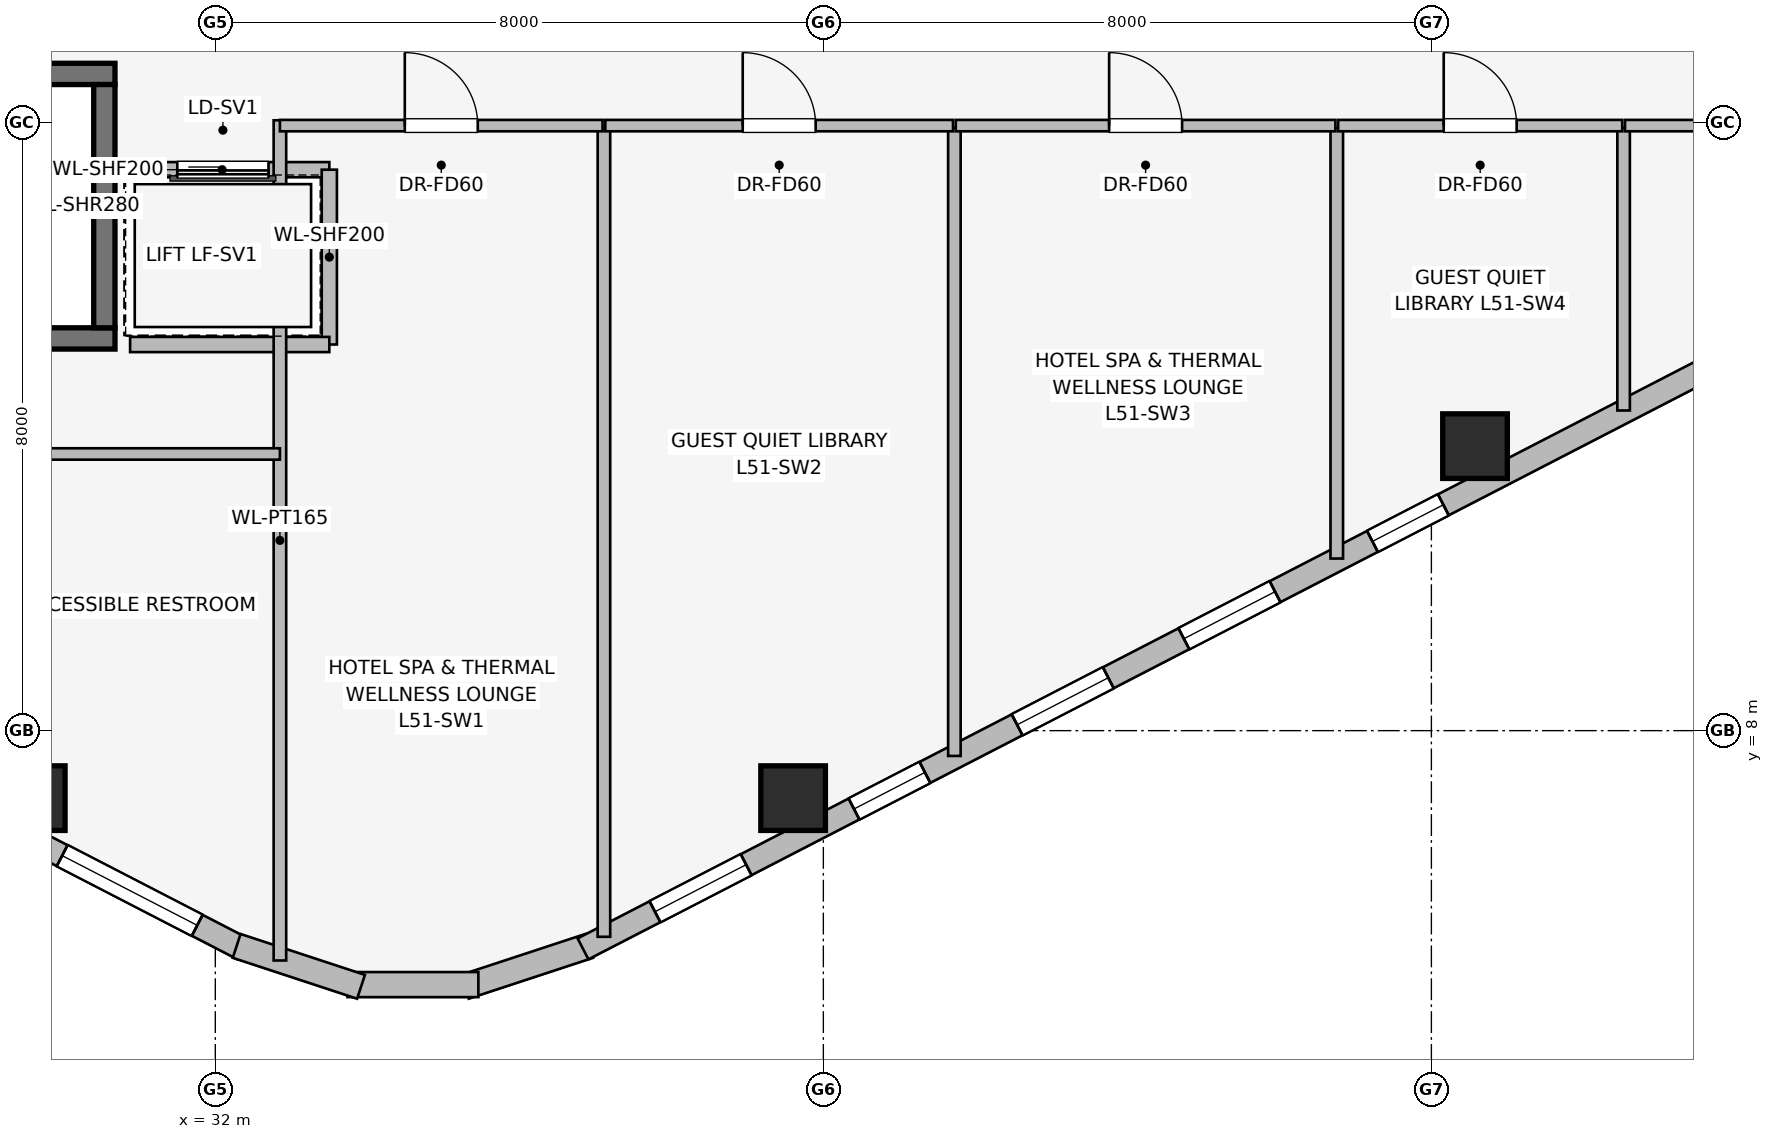
"""IFC4 building model, lengths in metres.
Left out: names, types, materials, properties, quantities, classifications, styles, units other than length and angle.
Written with IfcOpenShell. Run it as: python <this file> out.ifc"""

import sys

from ifc_helpers import new_model, si_unit, direction, frame, frame_2d, origin, origin_2d, place, context, subcontext, project, spatial, rectangle, extrude, element, fill, save


model = new_model("IFC4")
c1 = context("Model", 3, precision=1e-05, world=origin(), true_north=direction((0.0, 1.0)))
c2 = subcontext(c1, "Body", "Model", "MODEL_VIEW")
j1 = project(units=[si_unit("LENGTHUNIT", "METRE"), si_unit("PLANEANGLEUNIT", "RADIAN")], contexts=[c1])
p1 = place(None, origin())
s1 = spatial("IfcSite", under=j1, at=p1, CompositionType="ELEMENT")
p2 = place(p1, origin())
s2 = spatial("IfcBuilding", under=s1, at=p2, CompositionType="ELEMENT")
p3 = place(p2, frame((0.0, 0.0, 187.8)))
s3 = spatial("IfcBuildingStorey", under=s2, at=p3, CompositionType="ELEMENT", Elevation=187.8)
p4 = place(p3, frame((22.32, 13.16, 0.0), z_axis=(0.0, 0.0, 1.0), x_axis=(1.0, 0.0, 0.0)))
e1 = element("IfcWall", 1, at=p4, inside=s3, PredefinedType="SHEAR", context=c2, shape_type="SweptSolid", body=[
    extrude(rectangle(XDim=8.36, YDim=0.28, at=frame_2d((4.18, 0.0))), origin(), (0.0, 0.0, 1.0), 3.45),
])
p5 = place(p3, frame((30.68, 16.64, 0.0), z_axis=(0.0, 0.0, 1.0), x_axis=(-1.0, 0.0, 0.0)))
e2 = element("IfcWall", 2, at=p5, inside=s3, PredefinedType="SHEAR", context=c2, shape_type="SweptSolid", body=[
    extrude(rectangle(XDim=8.36, YDim=0.28, at=frame_2d((4.18, 0.0))), origin(), (0.0, 0.0, 1.0), 3.45),
])
p6 = place(p5, frame((6.08, 0.0, 0.0)))
e3 = element("IfcOpeningElement", 3, at=p6, cuts=e2, PredefinedType="OPENING", context=c2, shape_type="SweptSolid", body=[
    extrude(rectangle(XDim=1.05, YDim=2.0, at=frame_2d((0.525, 1.0))), frame((0.0, 0.15, 0.0), z_axis=(0.0, -1.0, 0.0), x_axis=(1.0, 0.0, 0.0)), (0.0, 0.0, 1.0), 0.3),
])
p7 = place(p3, frame((30.54, 13.3, 0.0), z_axis=(0.0, 0.0, 1.0), x_axis=(0.0, 1.0, 0.0)))
e4 = element("IfcWall", 4, at=p7, inside=s3, PredefinedType="SHEAR", context=c2, shape_type="SweptSolid", body=[
    extrude(rectangle(XDim=3.2, YDim=0.28, at=frame_2d((1.6, 0.0))), origin(), (0.0, 0.0, 1.0), 3.45),
])
for number, where, z_axis, x_axis in (
    (5, (29.598, 7.112, 0.0), (0.0, 0.0, 1.0), (1.0, 0.0, 0.0)),
    (6, (39.602, 7.112, 0.0), (0.0, 0.0, 1.0), (1.0, 0.0, 0.0)),
    (7, (48.574, 11.743, 0.0), (0.0, 0.0, 1.0), (1.0, 0.0, 0.0)),
):
    element("IfcColumn", number, at=place(p3, frame(where, z_axis=z_axis, x_axis=x_axis)), inside=s3, PredefinedType="COLUMN", context=c2, shape_type="SweptSolid", body=[
        extrude(rectangle(XDim=0.85, YDim=0.85, at=origin_2d()), origin(), (0.0, 0.0, 1.0), 3.45),
    ])
p8 = place(p3, frame((32.362, 5.129, 0.0), z_axis=(0.0, 0.0, 1.0), x_axis=(-0.888626188278, 0.458632202867, 0.0)))
e8 = element("IfcWall", 8, at=p8, inside=s3, PredefinedType="STANDARD", context=c2, shape_type="SweptSolid", body=[
    extrude(rectangle(XDim=16.828, YDim=0.31, at=frame_2d((8.414, 0.0))), origin(), (0.0, 0.0, 1.0), 3.14),
])
p9 = place(p8, frame((7.864, 0.0, 0.0)))
e9 = element("IfcOpeningElement", 9, at=p9, cuts=e8, PredefinedType="OPENING", context=c2, shape_type="SweptSolid", body=[
    extrude(rectangle(XDim=1.1, YDim=2.04, at=frame_2d((0.55, 1.02))), frame((0.0, 0.165, 0.0), z_axis=(0.0, -1.0, 0.0), x_axis=(1.0, 0.0, 0.0)), (0.0, 0.0, 1.0), 0.33),
])
p10 = place(p8, frame((0.675, 0.0, 0.75)))
e10 = element("IfcOpeningElement", 10, at=p10, cuts=e8, PredefinedType="OPENING", context=c2, shape_type="SweptSolid", body=[
    extrude(rectangle(XDim=2.0, YDim=1.5, at=frame_2d((1.0, 0.75))), frame((0.0, 0.165, 0.0), z_axis=(0.0, -1.0, 0.0), x_axis=(1.0, 0.0, 0.0)), (0.0, 0.0, 1.0), 0.33),
])
p11 = place(p8, frame((4.159, 0.0, 0.75)))
e11 = element("IfcOpeningElement", 11, at=p11, cuts=e8, PredefinedType="OPENING", context=c2, shape_type="SweptSolid", body=[
    extrude(rectangle(XDim=1.35, YDim=1.45, at=frame_2d((0.675, 0.725))), frame((0.0, 0.165, 0.0), z_axis=(0.0, -1.0, 0.0), x_axis=(1.0, 0.0, 0.0)), (0.0, 0.0, 1.0), 0.33),
])
p12 = place(p8, frame((5.966, 0.0, 0.75)))
e12 = element("IfcOpeningElement", 12, at=p12, cuts=e8, PredefinedType="OPENING", context=c2, shape_type="SweptSolid", body=[
    extrude(rectangle(XDim=1.35, YDim=1.45, at=frame_2d((0.675, 0.725))), frame((0.0, 0.165, 0.0), z_axis=(0.0, -1.0, 0.0), x_axis=(1.0, 0.0, 0.0)), (0.0, 0.0, 1.0), 0.33),
])
p13 = place(p8, frame((10.091, 0.0, 0.75)))
e13 = element("IfcOpeningElement", 13, at=p13, cuts=e8, PredefinedType="OPENING", context=c2, shape_type="SweptSolid", body=[
    extrude(rectangle(XDim=2.0, YDim=1.5, at=frame_2d((1.0, 0.75))), frame((0.0, 0.165, 0.0), z_axis=(0.0, -1.0, 0.0), x_axis=(1.0, 0.0, 0.0)), (0.0, 0.0, 1.0), 0.33),
])
p14 = place(p8, frame((14.735, 0.0, 0.75)))
e14 = element("IfcOpeningElement", 14, at=p14, cuts=e8, PredefinedType="OPENING", context=c2, shape_type="SweptSolid", body=[
    extrude(rectangle(XDim=1.35, YDim=1.45, at=frame_2d((0.675, 0.725))), frame((0.0, 0.165, 0.0), z_axis=(0.0, -1.0, 0.0), x_axis=(1.0, 0.0, 0.0)), (0.0, 0.0, 1.0), 0.33),
])
p15 = place(p3, frame((36.919, 5.168, 0.0), z_axis=(0.0, 0.0, 1.0), x_axis=(-0.949937416267, -0.312440242569, 0.0)))
e15 = element("IfcWall", 15, at=p15, inside=s3, PredefinedType="STANDARD", context=c2, shape_type="SweptSolid", body=[
    extrude(rectangle(XDim=1.722, YDim=0.33, at=frame_2d((0.861, 0.0))), origin(), (0.0, 0.0, 1.0), 3.14),
])
p16 = place(p3, frame((35.461, 4.659, 0.0), z_axis=(0.0, 0.0, 1.0), x_axis=(-1.0, 0.0, 0.0)))
e16 = element("IfcWall", 16, at=p16, inside=s3, PredefinedType="STANDARD", context=c2, shape_type="SweptSolid", body=[
    extrude(rectangle(XDim=1.722, YDim=0.33, at=frame_2d((0.861, 0.0))), origin(), (0.0, 0.0, 1.0), 3.14),
])
p17 = place(p3, frame((33.917, 4.63, 0.0), z_axis=(0.0, 0.0, 1.0), x_axis=(-0.949937416267, 0.312440242569, 0.0)))
e17 = element("IfcWall", 17, at=p17, inside=s3, PredefinedType="STANDARD", context=c2, shape_type="SweptSolid", body=[
    extrude(rectangle(XDim=1.722, YDim=0.33, at=frame_2d((0.861, 0.0))), origin(), (0.0, 0.0, 1.0), 3.14),
])
p18 = place(p3, frame((51.792, 12.847, 0.0), z_axis=(0.0, 0.0, 1.0), x_axis=(-0.888626188278, -0.458632202867, 0.0)))
e18 = element("IfcWall", 18, at=p18, inside=s3, PredefinedType="STANDARD", context=c2, shape_type="SweptSolid", body=[
    extrude(rectangle(XDim=16.828, YDim=0.31, at=frame_2d((8.414, 0.0))), origin(), (0.0, 0.0, 1.0), 3.14),
])
p19 = place(p18, frame((4.09, 0.0, 0.75)))
e19 = element("IfcOpeningElement", 19, at=p19, cuts=e18, PredefinedType="OPENING", context=c2, shape_type="SweptSolid", body=[
    extrude(rectangle(XDim=1.05, YDim=1.4, at=frame_2d((0.525, 0.7))), frame((0.0, 0.165, 0.0), z_axis=(0.0, -1.0, 0.0), x_axis=(1.0, 0.0, 0.0)), (0.0, 0.0, 1.0), 0.33),
])
p20 = place(p18, frame((6.582, 0.0, 0.75)))
e20 = element("IfcOpeningElement", 20, at=p20, cuts=e18, PredefinedType="OPENING", context=c2, shape_type="SweptSolid", body=[
    extrude(rectangle(XDim=1.35, YDim=1.45, at=frame_2d((0.675, 0.725))), frame((0.0, 0.165, 0.0), z_axis=(0.0, -1.0, 0.0), x_axis=(1.0, 0.0, 0.0)), (0.0, 0.0, 1.0), 0.33),
])
p21 = place(p18, frame((9.051, 0.0, 0.75)))
e21 = element("IfcOpeningElement", 21, at=p21, cuts=e18, PredefinedType="OPENING", context=c2, shape_type="SweptSolid", body=[
    extrude(rectangle(XDim=1.35, YDim=1.45, at=frame_2d((0.675, 0.725))), frame((0.0, 0.165, 0.0), z_axis=(0.0, -1.0, 0.0), x_axis=(1.0, 0.0, 0.0)), (0.0, 0.0, 1.0), 0.33),
])
p22 = place(p18, frame((11.766, 0.0, 0.75)))
e22 = element("IfcOpeningElement", 22, at=p22, cuts=e18, PredefinedType="OPENING", context=c2, shape_type="SweptSolid", body=[
    extrude(rectangle(XDim=1.05, YDim=1.4, at=frame_2d((0.525, 0.7))), frame((0.0, 0.165, 0.0), z_axis=(0.0, -1.0, 0.0), x_axis=(1.0, 0.0, 0.0)), (0.0, 0.0, 1.0), 0.33),
])
p23 = place(p18, frame((14.413, 0.0, 0.75)))
e23 = element("IfcOpeningElement", 23, at=p23, cuts=e18, PredefinedType="OPENING", context=c2, shape_type="SweptSolid", body=[
    extrude(rectangle(XDim=1.35, YDim=1.45, at=frame_2d((0.675, 0.725))), frame((0.0, 0.165, 0.0), z_axis=(0.0, -1.0, 0.0), x_axis=(1.0, 0.0, 0.0)), (0.0, 0.0, 1.0), 0.33),
])
p24 = place(p3, frame((33.5, 15.38, 0.0), z_axis=(0.0, 0.0, 1.0), x_axis=(-1.0, 0.0, 0.0)))
e24 = element("IfcWall", 24, at=p24, inside=s3, PredefinedType="PARTITIONING", context=c2, shape_type="SweptSolid", body=[
    extrude(rectangle(XDim=2.82, YDim=0.2, at=frame_2d((1.41, 0.0))), origin(), (0.0, 0.0, 1.0), 3.14),
])
p25 = place(p24, frame((0.8, 0.0, 0.0)))
e25 = element("IfcOpeningElement", 25, at=p25, cuts=e24, PredefinedType="OPENING", context=c2, shape_type="SweptSolid", body=[
    extrude(rectangle(XDim=1.2, YDim=2.2, at=frame_2d((0.6, 1.1))), frame((0.0, 0.11, 0.0), z_axis=(0.0, -1.0, 0.0), x_axis=(1.0, 0.0, 0.0)), (0.0, 0.0, 1.0), 0.22),
])
p26 = place(p3, frame((33.5, 13.08, 0.0), z_axis=(0.0, 0.0, 1.0), x_axis=(0.0, 1.0, 0.0)))
e26 = element("IfcWall", 26, at=p26, inside=s3, PredefinedType="PARTITIONING", context=c2, shape_type="SweptSolid", body=[
    extrude(rectangle(XDim=2.3, YDim=0.2, at=frame_2d((1.15, 0.0))), origin(), (0.0, 0.0, 1.0), 3.14),
])
p27 = place(p3, frame((30.879, 13.08, 0.0), z_axis=(0.0, 0.0, 1.0), x_axis=(1.0, 0.0, 0.0)))
e27 = element("IfcWall", 27, at=p27, inside=s3, PredefinedType="PARTITIONING", context=c2, shape_type="SweptSolid", body=[
    extrude(rectangle(XDim=2.621, YDim=0.2, at=frame_2d((1.311, 0.0))), origin(), (0.0, 0.0, 1.0), 3.14),
])
p28 = place(p3, frame((32.85, 4.976, 0.0), z_axis=(0.0, 0.0, 1.0), x_axis=(0.0, 1.0, 0.0)))
e28 = element("IfcWall", 28, at=p28, inside=s3, PredefinedType="PARTITIONING", context=c2, shape_type="SweptSolid", body=[
    extrude(rectangle(XDim=11.054, YDim=0.165, at=frame_2d((5.527, 0.0))), origin(), (0.0, 0.0, 1.0), 3.14),
])
p29 = place(p3, frame((19.757, 11.64, 0.0), z_axis=(0.0, 0.0, 1.0), x_axis=(1.0, 0.0, 0.0)))
e29 = element("IfcWall", 29, at=p29, inside=s3, PredefinedType="PARTITIONING", context=c2, shape_type="SweptSolid", body=[
    extrude(rectangle(XDim=13.093, YDim=0.15, at=frame_2d((6.546, 0.0))), origin(), (0.0, 0.0, 1.0), 3.14),
])
p30 = place(p29, frame((3.243, 0.0, 0.0)))
e30 = element("IfcOpeningElement", 30, at=p30, cuts=e29, PredefinedType="OPENING", context=c2, shape_type="SweptSolid", body=[
    extrude(rectangle(XDim=0.9, YDim=2.0, at=frame_2d((0.45, 1.0))), frame((0.0, 0.085, 0.0), z_axis=(0.0, -1.0, 0.0), x_axis=(1.0, 0.0, 0.0)), (0.0, 0.0, 1.0), 0.17),
])
p31 = place(p3, frame((37.113, 5.288, 0.0), z_axis=(0.0, 0.0, 1.0), x_axis=(0.0, 1.0, 0.0)))
e31 = element("IfcWall", 31, at=p31, inside=s3, PredefinedType="PARTITIONING", context=c2, shape_type="SweptSolid", body=[
    extrude(rectangle(XDim=10.642, YDim=0.165, at=frame_2d((5.321, 0.0))), origin(), (0.0, 0.0, 1.0), 3.14),
])
p32 = place(p3, frame((41.724, 7.667, 0.0), z_axis=(0.0, 0.0, 1.0), x_axis=(0.0, 1.0, 0.0)))
e32 = element("IfcWall", 32, at=p32, inside=s3, PredefinedType="PARTITIONING", context=c2, shape_type="SweptSolid", body=[
    extrude(rectangle(XDim=8.263, YDim=0.165, at=frame_2d((4.131, 0.0))), origin(), (0.0, 0.0, 1.0), 3.14),
])
p33 = place(p3, frame((46.755, 10.264, 0.0), z_axis=(0.0, 0.0, 1.0), x_axis=(0.0, 1.0, 0.0)))
e33 = element("IfcWall", 33, at=p33, inside=s3, PredefinedType="PARTITIONING", context=c2, shape_type="SweptSolid", body=[
    extrude(rectangle(XDim=5.666, YDim=0.165, at=frame_2d((2.833, 0.0))), origin(), (0.0, 0.0, 1.0), 3.14),
])
p34 = place(p3, frame((50.529, 12.212, 0.0), z_axis=(0.0, 0.0, 1.0), x_axis=(0.0, 1.0, 0.0)))
e34 = element("IfcWall", 34, at=p34, inside=s3, PredefinedType="PARTITIONING", context=c2, shape_type="SweptSolid", body=[
    extrude(rectangle(XDim=3.718, YDim=0.165, at=frame_2d((1.859, 0.0))), origin(), (0.0, 0.0, 1.0), 3.14),
])
p35 = place(p3, frame((32.85, 15.96, 0.0), z_axis=(0.0, 0.0, 1.0), x_axis=(1.0, 0.0, 0.0)))
e35 = element("IfcWall", 35, at=p35, inside=s3, PredefinedType="PARTITIONING", context=c2, shape_type="SweptSolid", body=[
    extrude(rectangle(XDim=4.245, YDim=0.15, at=frame_2d((2.123, 0.0))), origin(), (0.0, 0.0, 1.0), 3.14),
])
p36 = place(p35, frame((1.643, 0.0, 0.0)))
e36 = element("IfcOpeningElement", 36, at=p36, cuts=e35, PredefinedType="OPENING", context=c2, shape_type="SweptSolid", body=[
    extrude(rectangle(XDim=0.96, YDim=2.0, at=frame_2d((0.48, 1.0))), frame((0.0, 0.085, 0.0), z_axis=(0.0, -1.0, 0.0), x_axis=(1.0, 0.0, 0.0)), (0.0, 0.0, 1.0), 0.17),
])
p37 = place(p3, frame((37.131, 15.96, 0.0), z_axis=(0.0, 0.0, 1.0), x_axis=(1.0, 0.0, 0.0)))
e37 = element("IfcWall", 37, at=p37, inside=s3, PredefinedType="PARTITIONING", context=c2, shape_type="SweptSolid", body=[
    extrude(rectangle(XDim=4.575, YDim=0.15, at=frame_2d((2.288, 0.0))), origin(), (0.0, 0.0, 1.0), 3.14),
])
p38 = place(p37, frame((1.808, 0.0, 0.0)))
e38 = element("IfcOpeningElement", 38, at=p38, cuts=e37, PredefinedType="OPENING", context=c2, shape_type="SweptSolid", body=[
    extrude(rectangle(XDim=0.96, YDim=2.0, at=frame_2d((0.48, 1.0))), frame((0.0, 0.085, 0.0), z_axis=(0.0, -1.0, 0.0), x_axis=(1.0, 0.0, 0.0)), (0.0, 0.0, 1.0), 0.17),
])
p39 = place(p3, frame((41.742, 15.96, 0.0), z_axis=(0.0, 0.0, 1.0), x_axis=(1.0, 0.0, 0.0)))
e39 = element("IfcWall", 39, at=p39, inside=s3, PredefinedType="PARTITIONING", context=c2, shape_type="SweptSolid", body=[
    extrude(rectangle(XDim=4.995, YDim=0.15, at=frame_2d((2.498, 0.0))), origin(), (0.0, 0.0, 1.0), 3.14),
])
p40 = place(p39, frame((2.018, 0.0, 0.0)))
e40 = element("IfcOpeningElement", 40, at=p40, cuts=e39, PredefinedType="OPENING", context=c2, shape_type="SweptSolid", body=[
    extrude(rectangle(XDim=0.96, YDim=2.0, at=frame_2d((0.48, 1.0))), frame((0.0, 0.085, 0.0), z_axis=(0.0, -1.0, 0.0), x_axis=(1.0, 0.0, 0.0)), (0.0, 0.0, 1.0), 0.17),
])
p41 = place(p3, frame((46.773, 15.96, 0.0), z_axis=(0.0, 0.0, 1.0), x_axis=(1.0, 0.0, 0.0)))
e41 = element("IfcWall", 41, at=p41, inside=s3, PredefinedType="PARTITIONING", context=c2, shape_type="SweptSolid", body=[
    extrude(rectangle(XDim=3.738, YDim=0.15, at=frame_2d((1.869, 0.0))), origin(), (0.0, 0.0, 1.0), 3.14),
])
p42 = place(p41, frame((1.389, 0.0, 0.0)))
e42 = element("IfcOpeningElement", 42, at=p42, cuts=e41, PredefinedType="OPENING", context=c2, shape_type="SweptSolid", body=[
    extrude(rectangle(XDim=0.96, YDim=2.0, at=frame_2d((0.48, 1.0))), frame((0.0, 0.085, 0.0), z_axis=(0.0, -1.0, 0.0), x_axis=(1.0, 0.0, 0.0)), (0.0, 0.0, 1.0), 0.17),
])
p43 = place(p3, frame((50.547, 15.96, 0.0), z_axis=(0.0, 0.0, 1.0), x_axis=(1.0, 0.0, 0.0)))
e43 = element("IfcWall", 43, at=p43, inside=s3, PredefinedType="PARTITIONING", context=c2, shape_type="SweptSolid", body=[
    extrude(rectangle(XDim=3.516, YDim=0.15, at=frame_2d((1.758, 0.0))), origin(), (0.0, 0.0, 1.0), 3.14),
])
p44 = place(p43, frame((1.347, 0.0, 0.0)))
e44 = element("IfcOpeningElement", 44, at=p44, cuts=e43, PredefinedType="OPENING", context=c2, shape_type="SweptSolid", body=[
    extrude(rectangle(XDim=0.96, YDim=2.0, at=frame_2d((0.48, 1.0))), frame((0.0, 0.085, 0.0), z_axis=(0.0, -1.0, 0.0), x_axis=(1.0, 0.0, 0.0)), (0.0, 0.0, 1.0), 0.17),
])
p45 = place(p10, origin())
e45 = element("IfcWindow", 45, at=p45, inside=s3, PartitioningType="SINGLE_PANEL", PredefinedType="WINDOW", context=c2, shape_type="SweptSolid", body=[
    extrude(rectangle(XDim=2.0, YDim=1.5, at=frame_2d((1.0, 0.75))), frame((0.0, 0.03, 0.0), z_axis=(0.0, -1.0, 0.0), x_axis=(1.0, 0.0, 0.0)), (0.0, 0.0, 1.0), 0.06),
])
fill(e10, e45)
p46 = place(p19, origin())
e46 = element("IfcWindow", 46, at=p46, inside=s3, PartitioningType="SINGLE_PANEL", PredefinedType="WINDOW", context=c2, shape_type="SweptSolid", body=[
    extrude(rectangle(XDim=1.05, YDim=1.4, at=frame_2d((0.525, 0.7))), frame((0.0, 0.03, 0.0), z_axis=(0.0, -1.0, 0.0), x_axis=(1.0, 0.0, 0.0)), (0.0, 0.0, 1.0), 0.06),
])
fill(e19, e46)
p47 = place(p20, origin())
e47 = element("IfcWindow", 47, at=p47, inside=s3, PartitioningType="SINGLE_PANEL", PredefinedType="WINDOW", context=c2, shape_type="SweptSolid", body=[
    extrude(rectangle(XDim=1.35, YDim=1.45, at=frame_2d((0.675, 0.725))), frame((0.0, 0.03, 0.0), z_axis=(0.0, -1.0, 0.0), x_axis=(1.0, 0.0, 0.0)), (0.0, 0.0, 1.0), 0.06),
])
fill(e20, e47)
p48 = place(p21, origin())
e48 = element("IfcWindow", 48, at=p48, inside=s3, PartitioningType="SINGLE_PANEL", PredefinedType="WINDOW", context=c2, shape_type="SweptSolid", body=[
    extrude(rectangle(XDim=1.35, YDim=1.45, at=frame_2d((0.675, 0.725))), frame((0.0, 0.03, 0.0), z_axis=(0.0, -1.0, 0.0), x_axis=(1.0, 0.0, 0.0)), (0.0, 0.0, 1.0), 0.06),
])
fill(e21, e48)
p49 = place(p22, origin())
e49 = element("IfcWindow", 49, at=p49, inside=s3, PartitioningType="SINGLE_PANEL", PredefinedType="WINDOW", context=c2, shape_type="SweptSolid", body=[
    extrude(rectangle(XDim=1.05, YDim=1.4, at=frame_2d((0.525, 0.7))), frame((0.0, 0.03, 0.0), z_axis=(0.0, -1.0, 0.0), x_axis=(1.0, 0.0, 0.0)), (0.0, 0.0, 1.0), 0.06),
])
fill(e22, e49)
p50 = place(p23, origin())
e50 = element("IfcWindow", 50, at=p50, inside=s3, PartitioningType="SINGLE_PANEL", PredefinedType="WINDOW", context=c2, shape_type="SweptSolid", body=[
    extrude(rectangle(XDim=1.35, YDim=1.45, at=frame_2d((0.675, 0.725))), frame((0.0, 0.03, 0.0), z_axis=(0.0, -1.0, 0.0), x_axis=(1.0, 0.0, 0.0)), (0.0, 0.0, 1.0), 0.06),
])
fill(e23, e50)
p51 = place(p25, origin())
e51 = element("IfcDoor", 51, at=p51, inside=s3, OperationType="SLIDING_TO_RIGHT", PredefinedType="DOOR", context=c2, shape_type="SweptSolid", body=[
    extrude(rectangle(XDim=1.2, YDim=2.2, at=frame_2d((0.6, 1.1))), frame((0.0, 0.025, 0.0), z_axis=(0.0, -1.0, 0.0), x_axis=(1.0, 0.0, 0.0)), (0.0, 0.0, 1.0), 0.05),
])
fill(e25, e51)
p52 = place(p36, origin())
e52 = element("IfcDoor", 52, at=p52, inside=s3, OperationType="SINGLE_SWING_LEFT", PredefinedType="DOOR", context=c2, shape_type="SweptSolid", body=[
    extrude(rectangle(XDim=0.96, YDim=2.0, at=frame_2d((0.48, 1.0))), frame((0.0, 0.025, 0.0), z_axis=(0.0, -1.0, 0.0), x_axis=(1.0, 0.0, 0.0)), (0.0, 0.0, 1.0), 0.05),
])
fill(e36, e52)
p53 = place(p38, origin())
e53 = element("IfcDoor", 53, at=p53, inside=s3, OperationType="SINGLE_SWING_LEFT", PredefinedType="DOOR", context=c2, shape_type="SweptSolid", body=[
    extrude(rectangle(XDim=0.96, YDim=2.0, at=frame_2d((0.48, 1.0))), frame((0.0, 0.025, 0.0), z_axis=(0.0, -1.0, 0.0), x_axis=(1.0, 0.0, 0.0)), (0.0, 0.0, 1.0), 0.05),
])
fill(e38, e53)
p54 = place(p40, origin())
e54 = element("IfcDoor", 54, at=p54, inside=s3, OperationType="SINGLE_SWING_LEFT", PredefinedType="DOOR", context=c2, shape_type="SweptSolid", body=[
    extrude(rectangle(XDim=0.96, YDim=2.0, at=frame_2d((0.48, 1.0))), frame((0.0, 0.025, 0.0), z_axis=(0.0, -1.0, 0.0), x_axis=(1.0, 0.0, 0.0)), (0.0, 0.0, 1.0), 0.05),
])
fill(e40, e54)
p55 = place(p42, origin())
e55 = element("IfcDoor", 55, at=p55, inside=s3, OperationType="SINGLE_SWING_LEFT", PredefinedType="DOOR", context=c2, shape_type="SweptSolid", body=[
    extrude(rectangle(XDim=0.96, YDim=2.0, at=frame_2d((0.48, 1.0))), frame((0.0, 0.025, 0.0), z_axis=(0.0, -1.0, 0.0), x_axis=(1.0, 0.0, 0.0)), (0.0, 0.0, 1.0), 0.05),
])
fill(e42, e55)
save(model, sys.argv[1])
